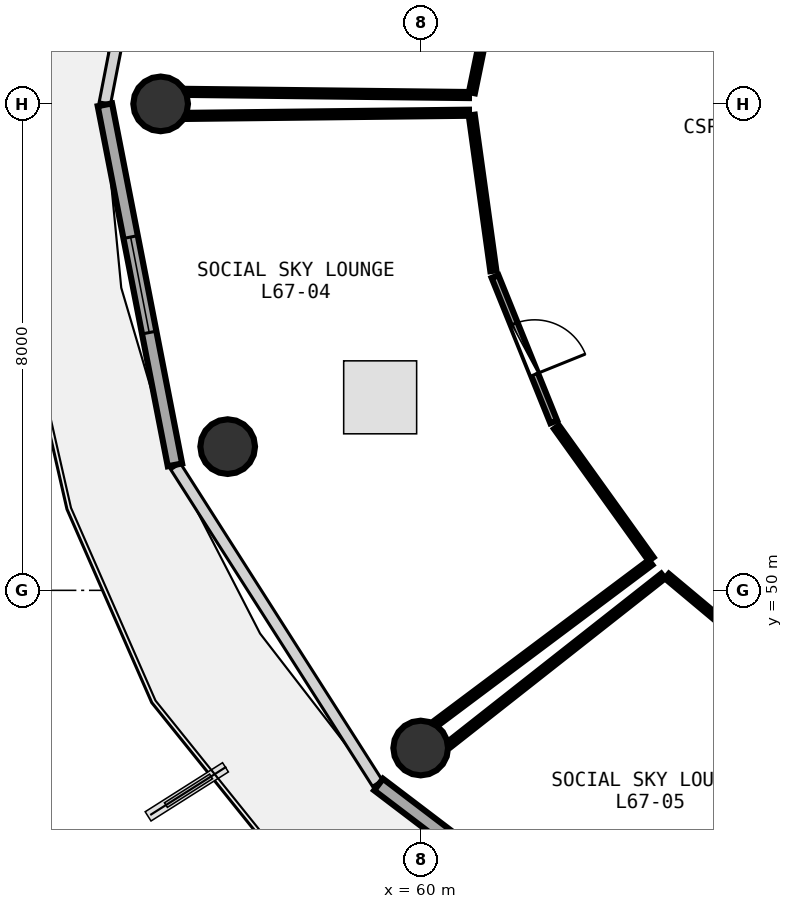
"""IFC4 building model, lengths in metres.
Left out: names, types, materials, properties, quantities, classifications, styles, units other than length and angle.
Written with IfcOpenShell. Run it as: python <this file> out.ifc"""

import sys

from ifc_helpers import new_model, si_unit, direction, frame, frame_2d, origin, origin_2d, place, context, subcontext, project, spatial, rectangle, circle, extrude, element, fill, save


model = new_model("IFC4")
c1 = context("Model", 3, precision=1e-05, world=origin(), true_north=direction((0.0, 1.0)))
c2 = subcontext(c1, "Body", "Model", "MODEL_VIEW")
j1 = project(units=[si_unit("LENGTHUNIT", "METRE"), si_unit("PLANEANGLEUNIT", "RADIAN")], contexts=[c1])
p1 = place(None, origin())
s1 = spatial("IfcSite", under=j1, at=p1, CompositionType="ELEMENT")
p2 = place(p1, origin())
s2 = spatial("IfcBuilding", under=s1, at=p2, CompositionType="ELEMENT")
p3 = place(p2, frame((0.0, 0.0, 263.7)))
s3 = spatial("IfcBuildingStorey", under=s2, at=p3, CompositionType="ELEMENT", Elevation=263.7)
for number, where, z_axis, x_axis in (
    (1, (55.72, 58.0, 0.0), (0.0, 0.0, 1.0), (1.0, 0.0, 0.0)),
    (2, (56.823, 52.364, 0.0), (0.0, 0.0, 1.0), (1.0, 0.0, 0.0)),
    (3, (59.997, 47.407, 0.0), (0.0, 0.0, 1.0), (1.0, 0.0, 0.0)),
):
    element("IfcColumn", number, at=place(p3, frame(where, z_axis=z_axis, x_axis=x_axis)), inside=s3, PredefinedType="COLUMN", context=c2, shape_type="SweptSolid", body=[
        extrude(circle(Radius=0.45, at=origin_2d()), origin(), (0.0, 0.0, 1.0), 3.75),
    ])
p4 = place(p3, frame((54.803, 57.985, 0.0), z_axis=(0.0, 0.0, 1.0), x_axis=(0.190969309115, -0.981596008028, 0.0)))
e4 = element("IfcWall", 4, at=p4, inside=s3, PredefinedType="SOLIDWALL", context=c2, shape_type="SweptSolid", body=[
    extrude(rectangle(XDim=6.033, YDim=0.24, at=frame_2d((3.017, 0.0))), origin(), (0.0, 0.0, 1.0), 3.475),
])
p5 = place(p4, frame((2.216, 0.0, 0.85)))
e5 = element("IfcOpeningElement", 5, at=p5, cuts=e4, PredefinedType="OPENING", context=c2, shape_type="SweptSolid", body=[
    extrude(rectangle(XDim=1.6, YDim=1.45, at=frame_2d((0.8, 0.725))), frame((0.0, 0.13, 0.0), z_axis=(0.0, -1.0, 0.0), x_axis=(1.0, 0.0, 0.0)), (0.0, 0.0, 1.0), 0.26),
])
p6 = place(p3, frame((59.304, 46.806, 0.0), z_axis=(0.0, 0.0, 1.0), x_axis=(0.796010444211, -0.605282886514, 0.0)))
e6 = element("IfcWall", 6, at=p6, inside=s3, PredefinedType="SOLIDWALL", context=c2, shape_type="SweptSolid", body=[
    extrude(rectangle(XDim=6.387, YDim=0.24, at=frame_2d((3.194, 0.0))), origin(), (0.0, 0.0, 1.0), 3.475),
])
p7 = place(p6, frame((2.394, 0.0, 0.85)))
e7 = element("IfcOpeningElement", 7, at=p7, cuts=e6, PredefinedType="OPENING", context=c2, shape_type="SweptSolid", body=[
    extrude(rectangle(XDim=1.6, YDim=1.45, at=frame_2d((0.8, 0.725))), frame((0.0, 0.13, 0.0), z_axis=(0.0, -1.0, 0.0), x_axis=(1.0, 0.0, 0.0)), (0.0, 0.0, 1.0), 0.26),
])
p8 = place(p3, frame((61.219, 55.16, 0.0), z_axis=(0.0, 0.0, 1.0), x_axis=(0.374574284654, -0.927196907499, 0.0)))
e8 = element("IfcWall", 8, at=p8, inside=s3, PredefinedType="PARTITIONING", context=c2, shape_type="SweptSolid", body=[
    extrude(rectangle(XDim=2.576, YDim=0.12, at=frame_2d((1.288, 0.0))), origin(), (0.0, 0.0, 1.0), 3.48),
])
p9 = place(p8, frame((0.838, 0.0, 0.0)))
e9 = element("IfcOpeningElement", 9, at=p9, cuts=e8, PredefinedType="OPENING", context=c2, shape_type="SweptSolid", body=[
    extrude(rectangle(XDim=0.9, YDim=2.08, at=frame_2d((0.45, 1.04))), frame((0.0, 0.07, 0.0), z_axis=(0.0, -1.0, 0.0), x_axis=(1.0, 0.0, 0.0)), (0.0, 0.0, 1.0), 0.14),
])
p10 = place(p3, frame((61.635, 62.066, 0.0), z_axis=(0.0, 0.0, 1.0), x_axis=(-0.200853183429, -0.979621354762, 0.0)))
e10 = element("IfcWall", 10, at=p10, inside=s3, PredefinedType="PARTITIONING", context=c2, shape_type="SweptSolid", body=[
    extrude(rectangle(XDim=3.963, YDim=0.1, at=frame_2d((1.981, 0.0))), origin(), (0.0, 0.0, 1.0), 3.48),
])
p11 = place(p3, frame((60.791, 58.146, 0.0), z_axis=(0.0, 0.0, 1.0), x_axis=(-0.999937174585, 0.01120923205, 0.0)))
e11 = element("IfcWall", 11, at=p11, inside=s3, PredefinedType="PARTITIONING", context=c2, shape_type="SweptSolid", body=[
    extrude(rectangle(XDim=4.639, YDim=0.1, at=frame_2d((2.32, 0.0))), origin(), (0.0, 0.0, 1.0), 3.075),
])
p12 = place(p3, frame((60.836, 57.815, 0.0), z_axis=(0.0, 0.0, 1.0), x_axis=(0.137359832701, -0.990521214493, 0.0)))
e12 = element("IfcWall", 12, at=p12, inside=s3, PredefinedType="PARTITIONING", context=c2, shape_type="SweptSolid", body=[
    extrude(rectangle(XDim=2.584, YDim=0.1, at=frame_2d((1.292, 0.0))), origin(), (0.0, 0.0, 1.0), 3.48),
])
p13 = place(p3, frame((62.23, 52.684, 0.0), z_axis=(0.0, 0.0, 1.0), x_axis=(0.582725386778, -0.812669135383, 0.0)))
e13 = element("IfcWall", 13, at=p13, inside=s3, PredefinedType="PARTITIONING", context=c2, shape_type="SweptSolid", body=[
    extrude(rectangle(XDim=2.669, YDim=0.1, at=frame_2d((1.334, 0.0))), origin(), (0.0, 0.0, 1.0), 3.075),
])
p14 = place(p3, frame((63.777, 50.458, 0.0), z_axis=(0.0, 0.0, 1.0), x_axis=(-0.800384816546, -0.599486568191, 0.0)))
e14 = element("IfcWall", 14, at=p14, inside=s3, PredefinedType="PARTITIONING", context=c2, shape_type="SweptSolid", body=[
    extrude(rectangle(XDim=4.414, YDim=0.1, at=frame_2d((2.207, 0.0))), origin(), (0.0, 0.0, 1.0), 3.175),
])
p15 = place(p3, frame((56.152, 57.802, 0.0), z_axis=(0.0, 0.0, 1.0), x_axis=(0.999937174585, 0.01120923205, 0.0)))
e15 = element("IfcWall", 15, at=p15, inside=s3, PredefinedType="PARTITIONING", context=c2, shape_type="SweptSolid", body=[
    extrude(rectangle(XDim=4.639, YDim=0.1, at=frame_2d((2.32, 0.0))), origin(), (0.0, 0.0, 1.0), 3.075),
])
p16 = place(p3, frame((64.046, 50.234, 0.0), z_axis=(0.0, 0.0, 1.0), x_axis=(0.767022676895, -0.641619991216, 0.0)))
e16 = element("IfcWall", 16, at=p16, inside=s3, PredefinedType="PARTITIONING", context=c2, shape_type="SweptSolid", body=[
    extrude(rectangle(XDim=2.741, YDim=0.1, at=frame_2d((1.371, 0.0))), origin(), (0.0, 0.0, 1.0), 3.075),
])
p17 = place(p3, frame((60.468, 47.468, 0.0), z_axis=(0.0, 0.0, 1.0), x_axis=(0.785736749878, 0.618561039745, 0.0)))
e17 = element("IfcWall", 17, at=p17, inside=s3, PredefinedType="PARTITIONING", context=c2, shape_type="SweptSolid", body=[
    extrude(rectangle(XDim=4.475, YDim=0.1, at=frame_2d((2.237, 0.0))), origin(), (0.0, 0.0, 1.0), 3.075),
])
p18 = place(p5, origin())
e18 = element("IfcWindow", 18, at=p18, inside=s3, PartitioningType="SINGLE_PANEL", PredefinedType="WINDOW", context=c2, shape_type="SweptSolid", body=[
    extrude(rectangle(XDim=1.6, YDim=1.45, at=frame_2d((0.8, 0.725))), frame((0.0, 0.03, 0.0), z_axis=(0.0, -1.0, 0.0), x_axis=(1.0, 0.0, 0.0)), (0.0, 0.0, 1.0), 0.06),
])
fill(e5, e18)
p19 = place(p9, origin())
e19 = element("IfcDoor", 19, at=p19, inside=s3, OperationType="SINGLE_SWING_RIGHT", PredefinedType="DOOR", context=c2, shape_type="SweptSolid", body=[
    extrude(rectangle(XDim=0.9, YDim=2.08, at=frame_2d((0.45, 1.04))), frame((0.0, 0.025, 0.0), z_axis=(0.0, -1.0, 0.0), x_axis=(1.0, 0.0, 0.0)), (0.0, 0.0, 1.0), 0.05),
])
fill(e9, e19)
save(model, sys.argv[1])
